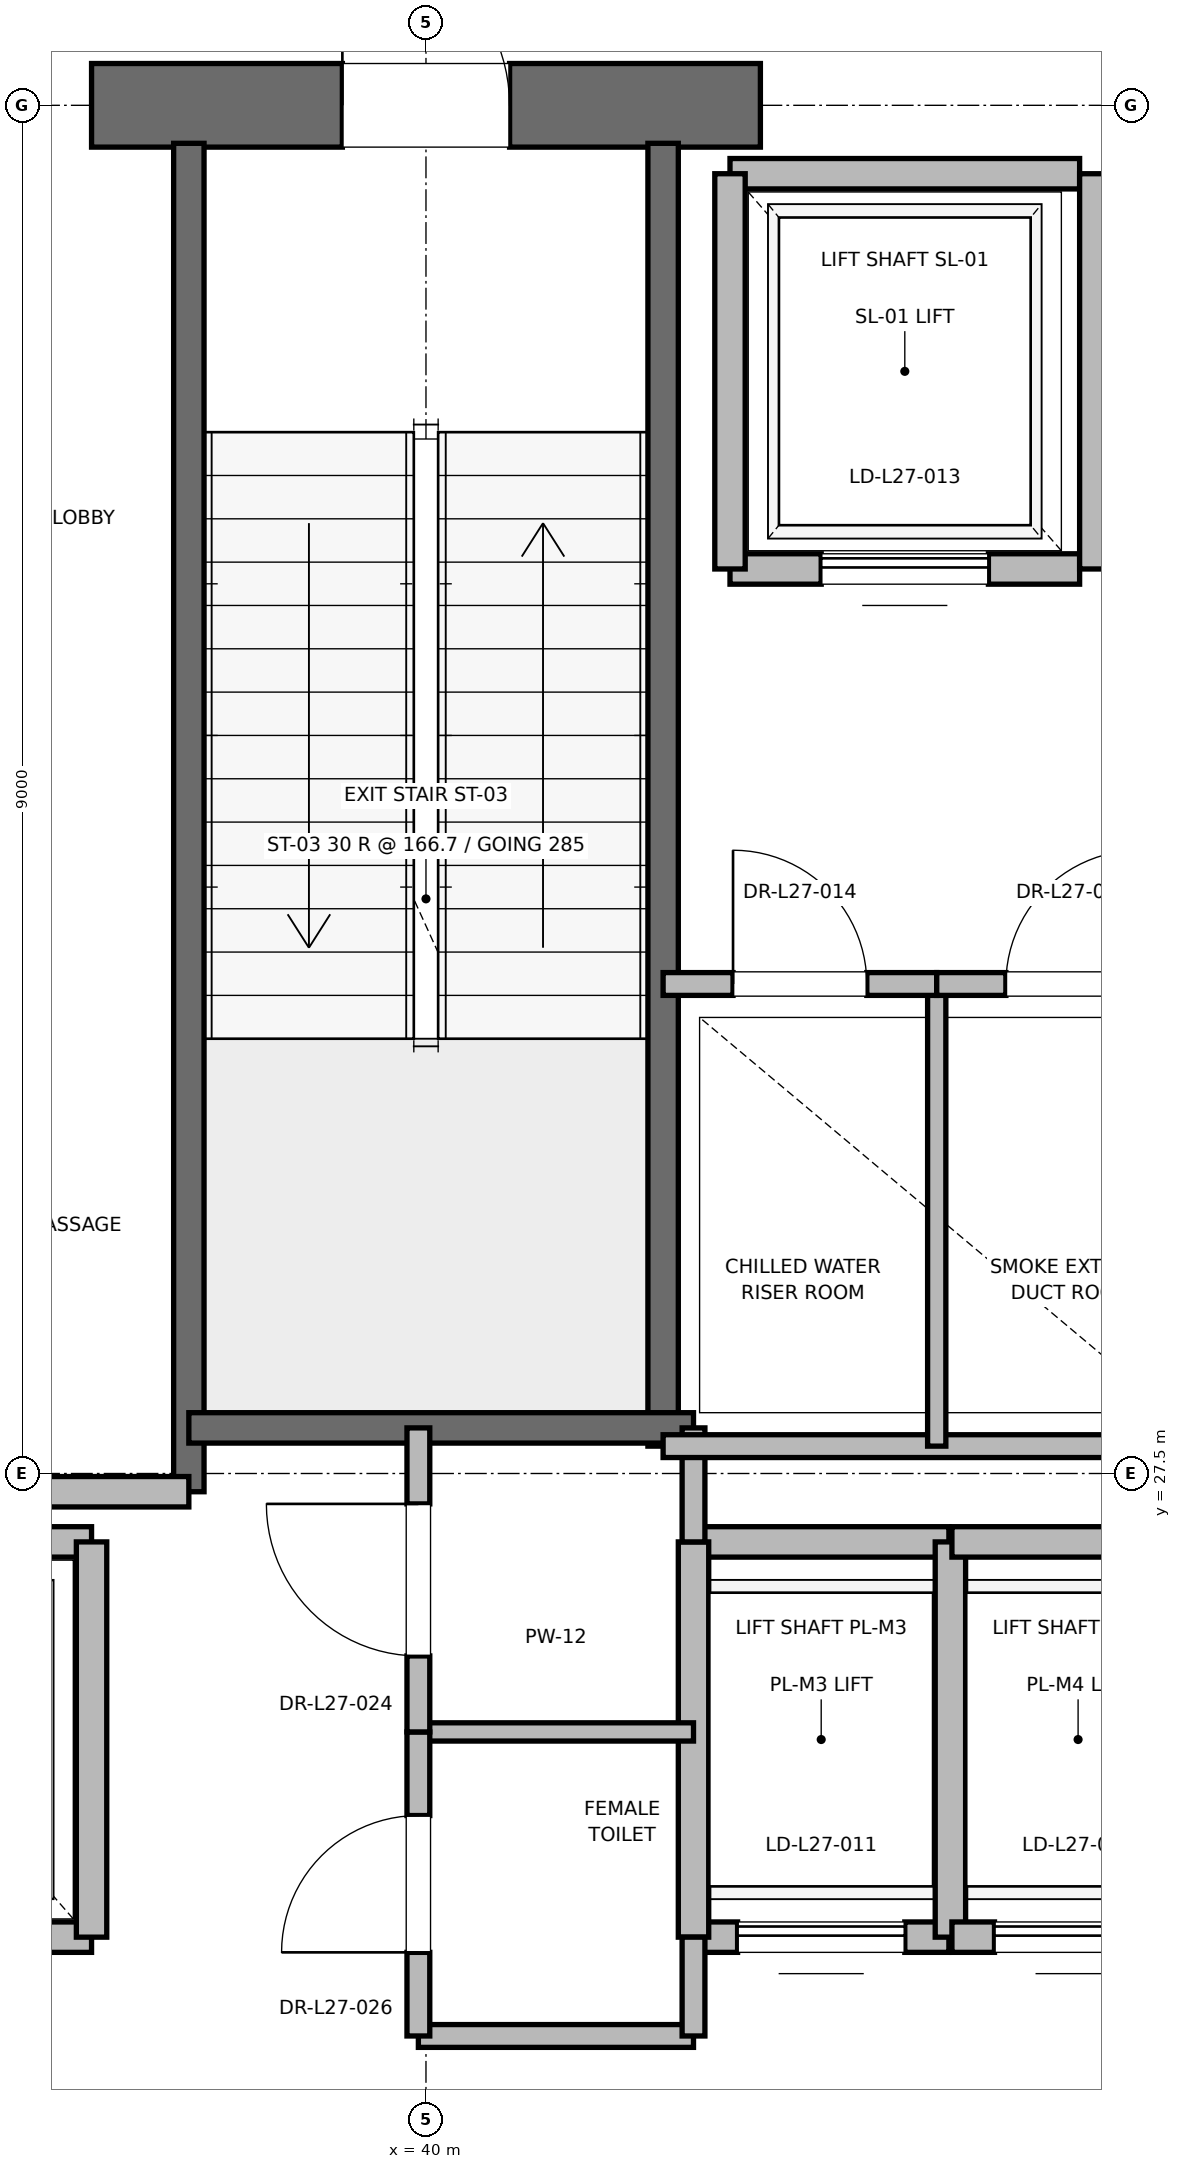
"""IFC4 building model, lengths in metres.
Left out: names, types, materials, properties, quantities, classifications, styles, units other than length and angle.
Written with IfcOpenShell. Run it as: python <this file> out.ifc"""

import sys

from ifc_helpers import new_model, si_unit, direction, frame, frame_2d, origin, place, context, subcontext, project, spatial, rectangle, extrude, element, fill, save


model = new_model("IFC4")
c1 = context("Model", 3, precision=1e-05, world=origin(), true_north=direction((0.0, 1.0)))
c2 = subcontext(c1, "Body", "Model", "MODEL_VIEW")
j1 = project(units=[si_unit("LENGTHUNIT", "METRE"), si_unit("PLANEANGLEUNIT", "RADIAN")], contexts=[c1])
p1 = place(None, origin())
s1 = spatial("IfcSite", under=j1, at=p1, CompositionType="ELEMENT")
p2 = place(p1, origin())
s2 = spatial("IfcBuilding", under=s1, at=p2, CompositionType="ELEMENT")
p3 = place(p2, frame((0.0, 0.0, 118.4)))
s3 = spatial("IfcBuildingStorey", under=s2, at=p3, CompositionType="ELEMENT", Elevation=118.4)
p4 = place(p3, frame((37.8, 36.5, 0.0), z_axis=(0.0, 0.0, 1.0), x_axis=(1.0, 0.0, 0.0)))
e1 = element("IfcWall", 1, at=p4, inside=s3, PredefinedType="SHEAR", context=c2, shape_type="SweptSolid", body=[
    extrude(rectangle(XDim=4.4, YDim=0.55, at=frame_2d((2.2, 0.0))), origin(), (0.0, 0.0, 1.0), 4.7),
])
p5 = place(p4, frame((1.65, 0.0, 0.0)))
e2 = element("IfcOpeningElement", 2, at=p5, cuts=e1, PredefinedType="OPENING", context=c2, shape_type="SweptSolid", body=[
    extrude(rectangle(XDim=1.1, YDim=2.15, at=frame_2d((0.55, 1.075))), frame((0.0, 0.275, 0.0), z_axis=(0.0, -1.0, 0.0), x_axis=(1.0, 0.0, 0.0)), (0.0, 0.0, 1.0), 0.55),
])
p6 = place(p3, frame((38.44, 27.38, 0.0), z_axis=(0.0, 0.0, 1.0), x_axis=(0.0, 1.0, 0.0)))
e3 = element("IfcWall", 3, at=p6, inside=s3, PredefinedType="SOLIDWALL", context=c2, shape_type="SweptSolid", body=[
    extrude(rectangle(XDim=8.87, YDim=0.2, at=frame_2d((4.435, 0.0))), origin(), (0.0, 0.0, 1.0), 4.7),
])
p7 = place(p3, frame((41.56, 27.68, 0.0), z_axis=(0.0, 0.0, 1.0), x_axis=(0.0, 1.0, 0.0)))
e4 = element("IfcWall", 4, at=p7, inside=s3, PredefinedType="SOLIDWALL", context=c2, shape_type="SweptSolid", body=[
    extrude(rectangle(XDim=8.57, YDim=0.2, at=frame_2d((4.285, 0.0))), origin(), (0.0, 0.0, 1.0), 4.7),
])
p8 = place(p3, frame((38.44, 27.8, 0.0), z_axis=(0.0, 0.0, 1.0), x_axis=(1.0, 0.0, 0.0)))
e5 = element("IfcWall", 5, at=p8, inside=s3, PredefinedType="SOLIDWALL", context=c2, shape_type="SweptSolid", body=[
    extrude(rectangle(XDim=3.32, YDim=0.2, at=frame_2d((1.66, 0.0))), origin(), (0.0, 0.0, 1.0), 4.7),
])
p9 = place(p3, frame((32.82, 27.38, 0.0), z_axis=(0.0, 0.0, 1.0), x_axis=(1.0, 0.0, 0.0)))
e6 = element("IfcWall", 6, at=p9, inside=s3, PredefinedType="PARTITIONING", context=c2, shape_type="SweptSolid", body=[
    extrude(rectangle(XDim=5.62, YDim=0.2, at=frame_2d((2.81, 0.0))), origin(), (0.0, 0.0, 1.0), 4.7),
])
p10 = place(p3, frame((35.5, 24.45, 0.0), z_axis=(0.0, 0.0, 1.0), x_axis=(1.0, 0.0, 0.0)))
e7 = element("IfcWall", 7, at=p10, inside=s3, PredefinedType="SOLIDWALL", context=c2, shape_type="SweptSolid", body=[
    extrude(rectangle(XDim=2.3, YDim=0.2, at=frame_2d((1.15, 0.0))), origin(), (0.0, 0.0, 1.0), 4.7),
])
p11 = place(p10, frame((0.6, 0.0, 0.0)))
e8 = element("IfcOpeningElement", 8, at=p11, cuts=e7, PredefinedType="OPENING", context=c2, shape_type="SweptSolid", body=[
    extrude(rectangle(XDim=1.1, YDim=2.2, at=frame_2d((0.55, 1.1))), frame((0.0, 0.1, 0.0), z_axis=(0.0, -1.0, 0.0), x_axis=(1.0, 0.0, 0.0)), (0.0, 0.0, 1.0), 0.2),
])
p12 = place(p3, frame((37.8, 27.05, 0.0), z_axis=(0.0, 0.0, 1.0), x_axis=(-1.0, 0.0, 0.0)))
e9 = element("IfcWall", 9, at=p12, inside=s3, PredefinedType="SOLIDWALL", context=c2, shape_type="SweptSolid", body=[
    extrude(rectangle(XDim=2.3, YDim=0.2, at=frame_2d((1.15, 0.0))), origin(), (0.0, 0.0, 1.0), 4.7),
])
p13 = place(p3, frame((37.8, 24.45, 0.0), z_axis=(0.0, 0.0, 1.0), x_axis=(0.0, 1.0, 0.0)))
e10 = element("IfcWall", 10, at=p13, inside=s3, PredefinedType="SOLIDWALL", context=c2, shape_type="SweptSolid", body=[
    extrude(rectangle(XDim=2.6, YDim=0.2, at=frame_2d((1.3, 0.0))), origin(), (0.0, 0.0, 1.0), 4.7),
])
p14 = place(p3, frame((41.76, 24.45, 0.0), z_axis=(0.0, 0.0, 1.0), x_axis=(1.0, 0.0, 0.0)))
e11 = element("IfcWall", 11, at=p14, inside=s3, PredefinedType="SOLIDWALL", context=c2, shape_type="SweptSolid", body=[
    extrude(rectangle(XDim=1.68, YDim=0.2, at=frame_2d((0.84, 0.0))), origin(), (0.0, 0.0, 1.0), 4.7),
])
p15 = place(p14, frame((0.29, 0.0, 0.0)))
e12 = element("IfcOpeningElement", 12, at=p15, cuts=e11, PredefinedType="OPENING", context=c2, shape_type="SweptSolid", body=[
    extrude(rectangle(XDim=1.1, YDim=2.2, at=frame_2d((0.55, 1.1))), frame((0.0, 0.1, 0.0), z_axis=(0.0, -1.0, 0.0), x_axis=(1.0, 0.0, 0.0)), (0.0, 0.0, 1.0), 0.2),
])
p16 = place(p3, frame((43.44, 27.05, 0.0), z_axis=(0.0, 0.0, 1.0), x_axis=(-1.0, 0.0, 0.0)))
e13 = element("IfcWall", 13, at=p16, inside=s3, PredefinedType="SOLIDWALL", context=c2, shape_type="SweptSolid", body=[
    extrude(rectangle(XDim=1.68, YDim=0.2, at=frame_2d((0.84, 0.0))), origin(), (0.0, 0.0, 1.0), 4.7),
])
for number, where, z_axis, x_axis in (
    (14, (41.76, 27.05, 0.0), (0.0, 0.0, 1.0), (0.0, -1.0, 0.0)),
    (15, (43.45, 24.45, 0.0), (0.0, 0.0, 1.0), (0.0, 1.0, 0.0)),
):
    element("IfcWall", number, at=place(p3, frame(where, z_axis=z_axis, x_axis=x_axis)), inside=s3, PredefinedType="SOLIDWALL", context=c2, shape_type="SweptSolid", body=[
        extrude(rectangle(XDim=2.6, YDim=0.2, at=frame_2d((1.3, 0.0))), origin(), (0.0, 0.0, 1.0), 4.7),
    ])
p17 = place(p3, frame((43.46, 24.45, 0.0), z_axis=(0.0, 0.0, 1.0), x_axis=(1.0, 0.0, 0.0)))
e16 = element("IfcWall", 16, at=p17, inside=s3, PredefinedType="SOLIDWALL", context=c2, shape_type="SweptSolid", body=[
    extrude(rectangle(XDim=1.66, YDim=0.2, at=frame_2d((0.83, 0.0))), origin(), (0.0, 0.0, 1.0), 4.7),
])
p18 = place(p17, frame((0.28, 0.0, 0.0)))
e17 = element("IfcOpeningElement", 17, at=p18, cuts=e16, PredefinedType="OPENING", context=c2, shape_type="SweptSolid", body=[
    extrude(rectangle(XDim=1.1, YDim=2.2, at=frame_2d((0.55, 1.1))), frame((0.0, 0.1, 0.0), z_axis=(0.0, -1.0, 0.0), x_axis=(1.0, 0.0, 0.0)), (0.0, 0.0, 1.0), 0.2),
])
p19 = place(p3, frame((45.12, 27.05, 0.0), z_axis=(0.0, 0.0, 1.0), x_axis=(-1.0, 0.0, 0.0)))
e18 = element("IfcWall", 18, at=p19, inside=s3, PredefinedType="SOLIDWALL", context=c2, shape_type="SweptSolid", body=[
    extrude(rectangle(XDim=1.66, YDim=0.2, at=frame_2d((0.83, 0.0))), origin(), (0.0, 0.0, 1.0), 4.7),
])
p20 = place(p3, frame((42.0, 33.45, 0.0), z_axis=(0.0, 0.0, 1.0), x_axis=(1.0, 0.0, 0.0)))
e19 = element("IfcWall", 19, at=p20, inside=s3, PredefinedType="SOLIDWALL", context=c2, shape_type="SweptSolid", body=[
    extrude(rectangle(XDim=2.3, YDim=0.2, at=frame_2d((1.15, 0.0))), origin(), (0.0, 0.0, 1.0), 4.7),
])
p21 = place(p20, frame((0.6, 0.0, 0.0)))
e20 = element("IfcOpeningElement", 20, at=p21, cuts=e19, PredefinedType="OPENING", context=c2, shape_type="SweptSolid", body=[
    extrude(rectangle(XDim=1.1, YDim=2.2, at=frame_2d((0.55, 1.1))), frame((0.0, 0.1, 0.0), z_axis=(0.0, -1.0, 0.0), x_axis=(1.0, 0.0, 0.0)), (0.0, 0.0, 1.0), 0.2),
])
p22 = place(p3, frame((44.3, 36.05, 0.0), z_axis=(0.0, 0.0, 1.0), x_axis=(-1.0, 0.0, 0.0)))
e21 = element("IfcWall", 21, at=p22, inside=s3, PredefinedType="SOLIDWALL", context=c2, shape_type="SweptSolid", body=[
    extrude(rectangle(XDim=2.3, YDim=0.2, at=frame_2d((1.15, 0.0))), origin(), (0.0, 0.0, 1.0), 3.68),
])
for number, where, z_axis, x_axis in (
    (22, (42.0, 36.05, 0.0), (0.0, 0.0, 1.0), (0.0, -1.0, 0.0)),
    (23, (44.4, 33.45, 0.0), (0.0, 0.0, 1.0), (0.0, 1.0, 0.0)),
):
    element("IfcWall", number, at=place(p3, frame(where, z_axis=z_axis, x_axis=x_axis)), inside=s3, PredefinedType="SOLIDWALL", context=c2, shape_type="SweptSolid", body=[
        extrude(rectangle(XDim=2.6, YDim=0.2, at=frame_2d((1.3, 0.0))), origin(), (0.0, 0.0, 1.0), 3.68),
    ])
p23 = place(p3, frame((39.95, 23.8, 0.0), z_axis=(0.0, 0.0, 1.0), x_axis=(1.0, 0.0, 0.0)))
e24 = element("IfcWall", 24, at=p23, inside=s3, PredefinedType="PARTITIONING", context=c2, shape_type="SweptSolid", body=[
    extrude(rectangle(XDim=1.81, YDim=0.15, at=frame_2d((0.905, 0.0))), origin(), (0.0, 0.0, 1.0), 2.85),
])
p24 = place(p3, frame((39.95, 25.8, 0.0), z_axis=(0.0, 0.0, 1.0), x_axis=(1.0, 0.0, 0.0)))
e25 = element("IfcWall", 25, at=p24, inside=s3, PredefinedType="PARTITIONING", context=c2, shape_type="SweptSolid", body=[
    extrude(rectangle(XDim=1.81, YDim=0.12, at=frame_2d((0.905, 0.0))), origin(), (0.0, 0.0, 1.0), 2.85),
])
p25 = place(p3, frame((41.76, 23.8, 0.0), z_axis=(0.0, 0.0, 1.0), x_axis=(0.0, 1.0, 0.0)))
e26 = element("IfcWall", 26, at=p25, inside=s3, PredefinedType="PARTITIONING", context=c2, shape_type="SweptSolid", body=[
    extrude(rectangle(XDim=0.65, YDim=0.15, at=frame_2d((0.325, 0.0))), origin(), (0.0, 0.0, 1.0), 2.85),
])
p26 = place(p3, frame((41.76, 27.05, 0.0), z_axis=(0.0, 0.0, 1.0), x_axis=(0.0, 1.0, 0.0)))
e27 = element("IfcWall", 27, at=p26, inside=s3, PredefinedType="PARTITIONING", context=c2, shape_type="SweptSolid", body=[
    extrude(rectangle(XDim=0.75, YDim=0.15, at=frame_2d((0.375, 0.0))), origin(), (0.0, 0.0, 1.0), 2.85),
])
p27 = place(p3, frame((39.95, 23.8, 0.0), z_axis=(0.0, 0.0, 1.0), x_axis=(0.0, 1.0, 0.0)))
e28 = element("IfcWall", 28, at=p27, inside=s3, PredefinedType="PARTITIONING", context=c2, shape_type="SweptSolid", body=[
    extrude(rectangle(XDim=2.0, YDim=0.15, at=frame_2d((1.0, 0.0))), origin(), (0.0, 0.0, 1.0), 2.85),
])
p28 = place(p27, frame((0.55, 0.0, 0.0)))
e29 = element("IfcOpeningElement", 29, at=p28, cuts=e28, PredefinedType="OPENING", context=c2, shape_type="SweptSolid", body=[
    extrude(rectangle(XDim=0.9, YDim=2.1, at=frame_2d((0.45, 1.05))), frame((0.0, 0.075, 0.0), z_axis=(0.0, -1.0, 0.0), x_axis=(1.0, 0.0, 0.0)), (0.0, 0.0, 1.0), 0.15),
])
p29 = place(p3, frame((39.95, 25.8, 0.0), z_axis=(0.0, 0.0, 1.0), x_axis=(0.0, 1.0, 0.0)))
e30 = element("IfcWall", 30, at=p29, inside=s3, PredefinedType="PARTITIONING", context=c2, shape_type="SweptSolid", body=[
    extrude(rectangle(XDim=2.0, YDim=0.15, at=frame_2d((1.0, 0.0))), origin(), (0.0, 0.0, 1.0), 2.85),
])
p30 = place(p29, frame((0.5, 0.0, 0.0)))
e31 = element("IfcOpeningElement", 31, at=p30, cuts=e30, PredefinedType="OPENING", context=c2, shape_type="SweptSolid", body=[
    extrude(rectangle(XDim=1.0, YDim=2.15, at=frame_2d((0.5, 1.075))), frame((0.0, 0.075, 0.0), z_axis=(0.0, -1.0, 0.0), x_axis=(1.0, 0.0, 0.0)), (0.0, 0.0, 1.0), 0.15),
])
p31 = place(p3, frame((41.56, 27.68, 0.0), z_axis=(0.0, 0.0, 1.0), x_axis=(1.0, 0.0, 0.0)))
e32 = element("IfcWall", 32, at=p31, inside=s3, PredefinedType="PARTITIONING", context=c2, shape_type="SweptSolid", body=[
    extrude(rectangle(XDim=3.59, YDim=0.15, at=frame_2d((1.795, 0.0))), origin(), (0.0, 0.0, 1.0), 2.85),
])
p32 = place(p3, frame((43.36, 27.68, 0.0), z_axis=(0.0, 0.0, 1.0), x_axis=(0.0, 1.0, 0.0)))
e33 = element("IfcWall", 33, at=p32, inside=s3, PredefinedType="PARTITIONING", context=c2, shape_type="SweptSolid", body=[
    extrude(rectangle(XDim=3.04, YDim=0.12, at=frame_2d((1.52, 0.0))), origin(), (0.0, 0.0, 1.0), 2.85),
])
p33 = place(p3, frame((41.56, 30.72, 0.0), z_axis=(0.0, 0.0, 1.0), x_axis=(1.0, 0.0, 0.0)))
e34 = element("IfcWall", 34, at=p33, inside=s3, PredefinedType="PARTITIONING", context=c2, shape_type="SweptSolid", body=[
    extrude(rectangle(XDim=1.8, YDim=0.15, at=frame_2d((0.9, 0.0))), origin(), (0.0, 0.0, 1.0), 2.85),
])
p34 = place(p33, frame((0.46, 0.0, 0.0)))
e35 = element("IfcOpeningElement", 35, at=p34, cuts=e34, PredefinedType="OPENING", context=c2, shape_type="SweptSolid", body=[
    extrude(rectangle(XDim=0.88, YDim=2.1, at=frame_2d((0.44, 1.05))), frame((0.0, 0.075, 0.0), z_axis=(0.0, -1.0, 0.0), x_axis=(1.0, 0.0, 0.0)), (0.0, 0.0, 1.0), 0.15),
])
p35 = place(p3, frame((43.36, 30.72, 0.0), z_axis=(0.0, 0.0, 1.0), x_axis=(1.0, 0.0, 0.0)))
e36 = element("IfcWall", 36, at=p35, inside=s3, PredefinedType="PARTITIONING", context=c2, shape_type="SweptSolid", body=[
    extrude(rectangle(XDim=1.79, YDim=0.15, at=frame_2d((0.895, 0.0))), origin(), (0.0, 0.0, 1.0), 2.85),
])
p36 = place(p35, frame((0.455, 0.0, 0.0)))
e37 = element("IfcOpeningElement", 37, at=p36, cuts=e36, PredefinedType="OPENING", context=c2, shape_type="SweptSolid", body=[
    extrude(rectangle(XDim=0.88, YDim=2.1, at=frame_2d((0.44, 1.05))), frame((0.0, 0.075, 0.0), z_axis=(0.0, -1.0, 0.0), x_axis=(1.0, 0.0, 0.0)), (0.0, 0.0, 1.0), 0.15),
])
p37 = place(p5, origin())
e38 = element("IfcDoor", 38, at=p37, inside=s3, OperationType="SINGLE_SWING_LEFT", PredefinedType="DOOR", context=c2, shape_type="SweptSolid", body=[
    extrude(rectangle(XDim=1.1, YDim=2.15, at=frame_2d((0.55, 1.075))), frame((0.0, 0.025, 0.0), z_axis=(0.0, -1.0, 0.0), x_axis=(1.0, 0.0, 0.0)), (0.0, 0.0, 1.0), 0.05),
])
fill(e2, e38)
p38 = place(p15, origin())
e39 = element("IfcDoor", 39, at=p38, inside=s3, OperationType="SLIDING_TO_RIGHT", PredefinedType="DOOR", context=c2, shape_type="SweptSolid", body=[
    extrude(rectangle(XDim=1.1, YDim=2.2, at=frame_2d((0.55, 1.1))), frame((0.0, 0.025, 0.0), z_axis=(0.0, -1.0, 0.0), x_axis=(1.0, 0.0, 0.0)), (0.0, 0.0, 1.0), 0.05),
])
fill(e12, e39)
p39 = place(p18, origin())
e40 = element("IfcDoor", 40, at=p39, inside=s3, OperationType="SLIDING_TO_RIGHT", PredefinedType="DOOR", context=c2, shape_type="SweptSolid", body=[
    extrude(rectangle(XDim=1.1, YDim=2.2, at=frame_2d((0.55, 1.1))), frame((0.0, 0.025, 0.0), z_axis=(0.0, -1.0, 0.0), x_axis=(1.0, 0.0, 0.0)), (0.0, 0.0, 1.0), 0.05),
])
fill(e17, e40)
p40 = place(p21, origin())
e41 = element("IfcDoor", 41, at=p40, inside=s3, OperationType="SLIDING_TO_RIGHT", PredefinedType="DOOR", context=c2, shape_type="SweptSolid", body=[
    extrude(rectangle(XDim=1.1, YDim=2.2, at=frame_2d((0.55, 1.1))), frame((0.0, 0.025, 0.0), z_axis=(0.0, -1.0, 0.0), x_axis=(1.0, 0.0, 0.0)), (0.0, 0.0, 1.0), 0.05),
])
fill(e20, e41)
p41 = place(p28, origin())
e42 = element("IfcDoor", 42, at=p41, inside=s3, OperationType="SINGLE_SWING_LEFT", PredefinedType="DOOR", context=c2, shape_type="SweptSolid", body=[
    extrude(rectangle(XDim=0.9, YDim=2.1, at=frame_2d((0.45, 1.05))), frame((0.0, 0.025, 0.0), z_axis=(0.0, -1.0, 0.0), x_axis=(1.0, 0.0, 0.0)), (0.0, 0.0, 1.0), 0.05),
])
fill(e29, e42)
p42 = place(p30, origin())
e43 = element("IfcDoor", 43, at=p42, inside=s3, OperationType="SINGLE_SWING_RIGHT", PredefinedType="DOOR", context=c2, shape_type="SweptSolid", body=[
    extrude(rectangle(XDim=1.0, YDim=2.15, at=frame_2d((0.5, 1.075))), frame((0.0, 0.025, 0.0), z_axis=(0.0, -1.0, 0.0), x_axis=(1.0, 0.0, 0.0)), (0.0, 0.0, 1.0), 0.05),
])
fill(e31, e43)
p43 = place(p34, origin())
e44 = element("IfcDoor", 44, at=p43, inside=s3, OperationType="SINGLE_SWING_LEFT", PredefinedType="DOOR", context=c2, shape_type="SweptSolid", body=[
    extrude(rectangle(XDim=0.88, YDim=2.1, at=frame_2d((0.44, 1.05))), frame((0.0, 0.025, 0.0), z_axis=(0.0, -1.0, 0.0), x_axis=(1.0, 0.0, 0.0)), (0.0, 0.0, 1.0), 0.05),
])
fill(e35, e44)
p44 = place(p36, origin())
e45 = element("IfcDoor", 45, at=p44, inside=s3, OperationType="SINGLE_SWING_RIGHT", PredefinedType="DOOR", context=c2, shape_type="SweptSolid", body=[
    extrude(rectangle(XDim=0.88, YDim=2.1, at=frame_2d((0.44, 1.05))), frame((0.0, 0.025, 0.0), z_axis=(0.0, -1.0, 0.0), x_axis=(1.0, 0.0, 0.0)), (0.0, 0.0, 1.0), 0.05),
])
fill(e37, e45)
save(model, sys.argv[1])
